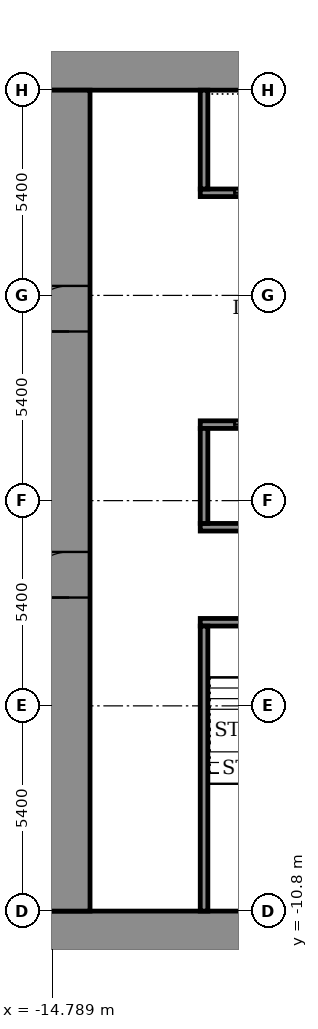
"""IFC4 building model, lengths in metres.
Left out: names, types, materials, properties, quantities, classifications, styles, units other than length and angle.
Written with IfcOpenShell. Run it as: python <this file> out.ifc"""

import sys

from ifc_helpers import new_model, si_unit, direction, frame, frame_2d, origin, place, context, subcontext, project, spatial, rectangle, extrude, element, fill, save


model = new_model("IFC4")
c1 = context("Model", 3, precision=1e-05, world=origin(), true_north=direction((0.0, 1.0)))
c2 = subcontext(c1, "Body", "Model", "MODEL_VIEW")
j1 = project(units=[si_unit("LENGTHUNIT", "METRE"), si_unit("PLANEANGLEUNIT", "RADIAN")], contexts=[c1])
p1 = place(None, origin())
s1 = spatial("IfcSite", under=j1, at=p1, CompositionType="ELEMENT")
p2 = place(p1, origin())
s2 = spatial("IfcBuilding", under=s1, at=p2, CompositionType="ELEMENT")
p3 = place(p2, frame((0.0, 0.0, 56.7)))
s3 = spatial("IfcBuildingStorey", under=s2, at=p3, CompositionType="ELEMENT", Elevation=56.7)
for number, where, z_axis, x_axis in (
    (1, (-14.9, -11.35, 0.0), (0.0, 0.0, 1.0), (1.0, 0.0, 0.0)),
    (2, (-14.9, 11.35, 0.0), (0.0, 0.0, 1.0), (1.0, 0.0, 0.0)),
):
    element("IfcWall", number, at=place(p3, frame(where, z_axis=z_axis, x_axis=x_axis)), inside=s3, PredefinedType="SHEAR", context=c2, shape_type="SweptSolid", body=[
        extrude(rectangle(XDim=29.8, YDim=1.1, at=frame_2d((14.9, 0.0))), origin(), (0.0, 0.0, 1.0), 3.6),
    ])
p4 = place(p3, frame((-14.35, -10.8, 0.0), z_axis=(0.0, 0.0, 1.0), x_axis=(0.0, 1.0, 0.0)))
e3 = element("IfcWall", 3, at=p4, inside=s3, PredefinedType="SHEAR", context=c2, shape_type="SweptSolid", body=[
    extrude(rectangle(XDim=21.6, YDim=1.1, at=frame_2d((10.8, 0.0))), origin(), (0.0, 0.0, 1.0), 3.6),
])
p5 = place(p4, frame((8.25, 0.0, 0.0)))
e4 = element("IfcOpeningElement", 4, at=p5, cuts=e3, PredefinedType="OPENING", context=c2, shape_type="SweptSolid", body=[
    extrude(rectangle(XDim=1.2, YDim=2.1, at=frame_2d((0.6, 1.05))), frame((0.0, 0.56, 0.0), z_axis=(0.0, -1.0, 0.0), x_axis=(1.0, 0.0, 0.0)), (0.0, 0.0, 1.0), 1.12),
])
p6 = place(p4, frame((15.25, 0.0, 0.0)))
e5 = element("IfcOpeningElement", 5, at=p6, cuts=e3, PredefinedType="OPENING", context=c2, shape_type="SweptSolid", body=[
    extrude(rectangle(XDim=1.2, YDim=2.1, at=frame_2d((0.6, 1.05))), frame((0.0, 0.56, 0.0), z_axis=(0.0, -1.0, 0.0), x_axis=(1.0, 0.0, 0.0)), (0.0, 0.0, 1.0), 1.12),
])
p7 = place(p3, frame((-10.9, -3.2, 0.0), z_axis=(0.0, 0.0, 1.0), x_axis=(1.0, 0.0, 0.0)))
e6 = element("IfcWall", 6, at=p7, inside=s3, PredefinedType="SHEAR", context=c2, shape_type="SweptSolid", body=[
    extrude(rectangle(XDim=21.8, YDim=0.2, at=frame_2d((10.9, 0.0))), origin(), (0.0, 0.0, 1.0), 3.05),
])
p8 = place(p7, frame((1.075, 0.0, 0.0)))
e7 = element("IfcOpeningElement", 7, at=p8, cuts=e6, PredefinedType="OPENING", context=c2, shape_type="SweptSolid", body=[
    extrude(rectangle(XDim=1.1, YDim=2.1, at=frame_2d((0.55, 1.05))), frame((0.0, 0.11, 0.0), z_axis=(0.0, -1.0, 0.0), x_axis=(1.0, 0.0, 0.0)), (0.0, 0.0, 1.0), 0.22),
])
p9 = place(p7, frame((10.325, 0.0, 0.0)))
e8 = element("IfcOpeningElement", 8, at=p9, cuts=e6, PredefinedType="OPENING", context=c2, shape_type="SweptSolid", body=[
    extrude(rectangle(XDim=1.1, YDim=2.1, at=frame_2d((0.55, 1.05))), frame((0.0, 0.11, 0.0), z_axis=(0.0, -1.0, 0.0), x_axis=(1.0, 0.0, 0.0)), (0.0, 0.0, 1.0), 0.22),
])
p10 = place(p7, frame((19.625, 0.0, 0.0)))
e9 = element("IfcOpeningElement", 9, at=p10, cuts=e6, PredefinedType="OPENING", context=c2, shape_type="SweptSolid", body=[
    extrude(rectangle(XDim=1.1, YDim=2.1, at=frame_2d((0.55, 1.05))), frame((0.0, 0.11, 0.0), z_axis=(0.0, -1.0, 0.0), x_axis=(1.0, 0.0, 0.0)), (0.0, 0.0, 1.0), 0.22),
])
p11 = place(p7, frame((5.7, 0.0, 0.0)))
e10 = element("IfcOpeningElement", 10, at=p11, cuts=e6, PredefinedType="OPENING", context=c2, shape_type="SweptSolid", body=[
    extrude(rectangle(XDim=1.1, YDim=2.1, at=frame_2d((0.55, 1.05))), frame((0.0, 0.11, 0.0), z_axis=(0.0, -1.0, 0.0), x_axis=(1.0, 0.0, 0.0)), (0.0, 0.0, 1.0), 0.22),
])
p12 = place(p7, frame((14.975, 0.0, 0.0)))
e11 = element("IfcOpeningElement", 11, at=p12, cuts=e6, PredefinedType="OPENING", context=c2, shape_type="SweptSolid", body=[
    extrude(rectangle(XDim=1.1, YDim=2.1, at=frame_2d((0.55, 1.05))), frame((0.0, 0.11, 0.0), z_axis=(0.0, -1.0, 0.0), x_axis=(1.0, 0.0, 0.0)), (0.0, 0.0, 1.0), 0.22),
])
p13 = place(p3, frame((-10.9, -0.7, 0.0), z_axis=(0.0, 0.0, 1.0), x_axis=(1.0, 0.0, 0.0)))
e12 = element("IfcWall", 12, at=p13, inside=s3, PredefinedType="SHEAR", context=c2, shape_type="SweptSolid", body=[
    extrude(rectangle(XDim=21.8, YDim=0.2, at=frame_2d((10.9, 0.0))), origin(), (0.0, 0.0, 1.0), 3.05),
])
p14 = place(p3, frame((-10.9, 2.0, 0.0), z_axis=(0.0, 0.0, 1.0), x_axis=(1.0, 0.0, 0.0)))
e13 = element("IfcWall", 13, at=p14, inside=s3, PredefinedType="SHEAR", context=c2, shape_type="SweptSolid", body=[
    extrude(rectangle(XDim=21.8, YDim=0.2, at=frame_2d((10.9, 0.0))), origin(), (0.0, 0.0, 1.0), 3.05),
])
p15 = place(p14, frame((0.9, 0.0, 0.0)))
e14 = element("IfcOpeningElement", 14, at=p15, cuts=e13, PredefinedType="OPENING", context=c2, shape_type="SweptSolid", body=[
    extrude(rectangle(XDim=1.1, YDim=2.1, at=frame_2d((0.55, 1.05))), frame((0.0, 0.11, 0.0), z_axis=(0.0, -1.0, 0.0), x_axis=(1.0, 0.0, 0.0)), (0.0, 0.0, 1.0), 0.22),
])
p16 = place(p14, frame((3.6, 0.0, 0.0)))
e15 = element("IfcOpeningElement", 15, at=p16, cuts=e13, PredefinedType="OPENING", context=c2, shape_type="SweptSolid", body=[
    extrude(rectangle(XDim=1.1, YDim=2.1, at=frame_2d((0.55, 1.05))), frame((0.0, 0.11, 0.0), z_axis=(0.0, -1.0, 0.0), x_axis=(1.0, 0.0, 0.0)), (0.0, 0.0, 1.0), 0.22),
])
p17 = place(p14, frame((6.3, 0.0, 0.0)))
e16 = element("IfcOpeningElement", 16, at=p17, cuts=e13, PredefinedType="OPENING", context=c2, shape_type="SweptSolid", body=[
    extrude(rectangle(XDim=1.1, YDim=2.1, at=frame_2d((0.55, 1.05))), frame((0.0, 0.11, 0.0), z_axis=(0.0, -1.0, 0.0), x_axis=(1.0, 0.0, 0.0)), (0.0, 0.0, 1.0), 0.22),
])
p18 = place(p14, frame((9.0, 0.0, 0.0)))
e17 = element("IfcOpeningElement", 17, at=p18, cuts=e13, PredefinedType="OPENING", context=c2, shape_type="SweptSolid", body=[
    extrude(rectangle(XDim=1.1, YDim=2.1, at=frame_2d((0.55, 1.05))), frame((0.0, 0.11, 0.0), z_axis=(0.0, -1.0, 0.0), x_axis=(1.0, 0.0, 0.0)), (0.0, 0.0, 1.0), 0.22),
])
p19 = place(p14, frame((11.7, 0.0, 0.0)))
e18 = element("IfcOpeningElement", 18, at=p19, cuts=e13, PredefinedType="OPENING", context=c2, shape_type="SweptSolid", body=[
    extrude(rectangle(XDim=1.1, YDim=2.1, at=frame_2d((0.55, 1.05))), frame((0.0, 0.11, 0.0), z_axis=(0.0, -1.0, 0.0), x_axis=(1.0, 0.0, 0.0)), (0.0, 0.0, 1.0), 0.22),
])
p20 = place(p14, frame((15.175, 0.0, 0.0)))
e19 = element("IfcOpeningElement", 19, at=p20, cuts=e13, PredefinedType="OPENING", context=c2, shape_type="SweptSolid", body=[
    extrude(rectangle(XDim=0.9, YDim=2.1, at=frame_2d((0.45, 1.05))), frame((0.0, 0.11, 0.0), z_axis=(0.0, -1.0, 0.0), x_axis=(1.0, 0.0, 0.0)), (0.0, 0.0, 1.0), 0.22),
])
p21 = place(p14, frame((19.225, 0.0, 0.0)))
e20 = element("IfcOpeningElement", 20, at=p21, cuts=e13, PredefinedType="OPENING", context=c2, shape_type="SweptSolid", body=[
    extrude(rectangle(XDim=0.9, YDim=2.1, at=frame_2d((0.45, 1.05))), frame((0.0, 0.11, 0.0), z_axis=(0.0, -1.0, 0.0), x_axis=(1.0, 0.0, 0.0)), (0.0, 0.0, 1.0), 0.22),
])
p22 = place(p3, frame((-10.9, 8.1, 0.0), z_axis=(0.0, 0.0, 1.0), x_axis=(1.0, 0.0, 0.0)))
e21 = element("IfcWall", 21, at=p22, inside=s3, PredefinedType="SHEAR", context=c2, shape_type="SweptSolid", body=[
    extrude(rectangle(XDim=21.8, YDim=0.2, at=frame_2d((10.9, 0.0))), origin(), (0.0, 0.0, 1.0), 3.05),
])
p23 = place(p22, frame((0.9, 0.0, 0.0)))
e22 = element("IfcOpeningElement", 22, at=p23, cuts=e21, PredefinedType="OPENING", context=c2, shape_type="SweptSolid", body=[
    extrude(rectangle(XDim=1.1, YDim=2.1, at=frame_2d((0.55, 1.05))), frame((0.0, 0.11, 0.0), z_axis=(0.0, -1.0, 0.0), x_axis=(1.0, 0.0, 0.0)), (0.0, 0.0, 1.0), 0.22),
])
p24 = place(p22, frame((3.6, 0.0, 0.0)))
e23 = element("IfcOpeningElement", 23, at=p24, cuts=e21, PredefinedType="OPENING", context=c2, shape_type="SweptSolid", body=[
    extrude(rectangle(XDim=1.1, YDim=2.1, at=frame_2d((0.55, 1.05))), frame((0.0, 0.11, 0.0), z_axis=(0.0, -1.0, 0.0), x_axis=(1.0, 0.0, 0.0)), (0.0, 0.0, 1.0), 0.22),
])
p25 = place(p22, frame((6.3, 0.0, 0.0)))
e24 = element("IfcOpeningElement", 24, at=p25, cuts=e21, PredefinedType="OPENING", context=c2, shape_type="SweptSolid", body=[
    extrude(rectangle(XDim=1.1, YDim=2.1, at=frame_2d((0.55, 1.05))), frame((0.0, 0.11, 0.0), z_axis=(0.0, -1.0, 0.0), x_axis=(1.0, 0.0, 0.0)), (0.0, 0.0, 1.0), 0.22),
])
p26 = place(p22, frame((9.0, 0.0, 0.0)))
e25 = element("IfcOpeningElement", 25, at=p26, cuts=e21, PredefinedType="OPENING", context=c2, shape_type="SweptSolid", body=[
    extrude(rectangle(XDim=1.1, YDim=2.1, at=frame_2d((0.55, 1.05))), frame((0.0, 0.11, 0.0), z_axis=(0.0, -1.0, 0.0), x_axis=(1.0, 0.0, 0.0)), (0.0, 0.0, 1.0), 0.22),
])
p27 = place(p22, frame((11.7, 0.0, 0.0)))
e26 = element("IfcOpeningElement", 26, at=p27, cuts=e21, PredefinedType="OPENING", context=c2, shape_type="SweptSolid", body=[
    extrude(rectangle(XDim=1.1, YDim=2.1, at=frame_2d((0.55, 1.05))), frame((0.0, 0.11, 0.0), z_axis=(0.0, -1.0, 0.0), x_axis=(1.0, 0.0, 0.0)), (0.0, 0.0, 1.0), 0.22),
])
p28 = place(p22, frame((15.175, 0.0, 0.0)))
e27 = element("IfcOpeningElement", 27, at=p28, cuts=e21, PredefinedType="OPENING", context=c2, shape_type="SweptSolid", body=[
    extrude(rectangle(XDim=0.9, YDim=2.1, at=frame_2d((0.45, 1.05))), frame((0.0, 0.11, 0.0), z_axis=(0.0, -1.0, 0.0), x_axis=(1.0, 0.0, 0.0)), (0.0, 0.0, 1.0), 0.22),
])
p29 = place(p22, frame((19.225, 0.0, 0.0)))
e28 = element("IfcOpeningElement", 28, at=p29, cuts=e21, PredefinedType="OPENING", context=c2, shape_type="SweptSolid", body=[
    extrude(rectangle(XDim=0.9, YDim=2.1, at=frame_2d((0.45, 1.05))), frame((0.0, 0.11, 0.0), z_axis=(0.0, -1.0, 0.0), x_axis=(1.0, 0.0, 0.0)), (0.0, 0.0, 1.0), 0.22),
])
p30 = place(p3, frame((-10.8, -10.8, 0.0), z_axis=(0.0, 0.0, 1.0), x_axis=(0.0, 1.0, 0.0)))
e29 = element("IfcWall", 29, at=p30, inside=s3, PredefinedType="SHEAR", context=c2, shape_type="SweptSolid", body=[
    extrude(rectangle(XDim=7.5, YDim=0.2, at=frame_2d((3.75, 0.0))), origin(), (0.0, 0.0, 1.0), 3.05),
])
p31 = place(p3, frame((-10.8, -0.6, 0.0), z_axis=(0.0, 0.0, 1.0), x_axis=(0.0, 1.0, 0.0)))
e30 = element("IfcWall", 30, at=p31, inside=s3, PredefinedType="SHEAR", context=c2, shape_type="SweptSolid", body=[
    extrude(rectangle(XDim=2.5, YDim=0.2, at=frame_2d((1.25, 0.0))), origin(), (0.0, 0.0, 1.0), 3.05),
])
p32 = place(p3, frame((-10.8, 8.2, 0.0), z_axis=(0.0, 0.0, 1.0), x_axis=(0.0, 1.0, 0.0)))
e31 = element("IfcWall", 31, at=p32, inside=s3, PredefinedType="SHEAR", context=c2, shape_type="SweptSolid", body=[
    extrude(rectangle(XDim=2.6, YDim=0.2, at=frame_2d((1.3, 0.0))), origin(), (0.0, 0.0, 1.0), 3.05),
])
p33 = place(p5, origin())
e32 = element("IfcDoor", 32, at=p33, inside=s3, OperationType="DOUBLE_DOOR_SINGLE_SWING", PredefinedType="DOOR", context=c2, shape_type="SweptSolid", body=[
    extrude(rectangle(XDim=1.2, YDim=2.1, at=frame_2d((0.6, 1.05))), frame((0.0, 0.025, 0.0), z_axis=(0.0, -1.0, 0.0), x_axis=(1.0, 0.0, 0.0)), (0.0, 0.0, 1.0), 0.05),
])
fill(e4, e32)
p34 = place(p6, origin())
e33 = element("IfcDoor", 33, at=p34, inside=s3, OperationType="DOUBLE_DOOR_SINGLE_SWING", PredefinedType="DOOR", context=c2, shape_type="SweptSolid", body=[
    extrude(rectangle(XDim=1.2, YDim=2.1, at=frame_2d((0.6, 1.05))), frame((0.0, 0.025, 0.0), z_axis=(0.0, -1.0, 0.0), x_axis=(1.0, 0.0, 0.0)), (0.0, 0.0, 1.0), 0.05),
])
fill(e5, e33)
p35 = place(p15, origin())
e34 = element("IfcDoor", 34, at=p35, inside=s3, OperationType="SLIDING_TO_LEFT", PredefinedType="DOOR", context=c2, shape_type="SweptSolid", body=[
    extrude(rectangle(XDim=1.1, YDim=2.1, at=frame_2d((0.55, 1.05))), frame((0.0, 0.025, 0.0), z_axis=(0.0, -1.0, 0.0), x_axis=(1.0, 0.0, 0.0)), (0.0, 0.0, 1.0), 0.05),
])
fill(e14, e34)
p36 = place(p23, origin())
e35 = element("IfcDoor", 35, at=p36, inside=s3, OperationType="SLIDING_TO_LEFT", PredefinedType="DOOR", context=c2, shape_type="SweptSolid", body=[
    extrude(rectangle(XDim=1.1, YDim=2.1, at=frame_2d((0.55, 1.05))), frame((0.0, 0.025, 0.0), z_axis=(0.0, -1.0, 0.0), x_axis=(1.0, 0.0, 0.0)), (0.0, 0.0, 1.0), 0.05),
])
fill(e22, e35)
save(model, sys.argv[1])
